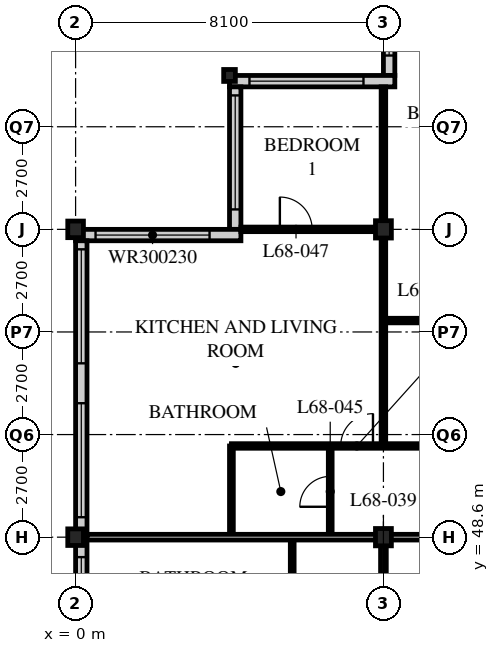
"""IFC4 building model, lengths in metres.
Left out: names, types, materials, properties, quantities, classifications, styles, units other than length and angle.
Written with IfcOpenShell. Run it as: python <this file> out.ifc"""

import sys

from ifc_helpers import new_model, si_unit, direction, frame, frame_2d, origin, origin_2d, place, context, subcontext, project, spatial, rectangle, i_section, extrude, element, fill, save


model = new_model("IFC4")
c1 = context("Model", 3, precision=1e-05, world=origin(), true_north=direction((0.0, 1.0)))
c2 = subcontext(c1, "Body", "Model", "MODEL_VIEW")
j1 = project(units=[si_unit("LENGTHUNIT", "METRE"), si_unit("PLANEANGLEUNIT", "RADIAN")], contexts=[c1])
p1 = place(None, origin())
s1 = spatial("IfcSite", under=j1, at=p1, CompositionType="ELEMENT")
p2 = place(p1, origin())
s2 = spatial("IfcBuilding", under=s1, at=p2, CompositionType="ELEMENT")
p3 = place(p2, frame((0.0, 0.0, 265.8)))
s3 = spatial("IfcBuildingStorey", under=s2, at=p3, CompositionType="ELEMENT", Elevation=265.8)
for number, where, z_axis, x_axis in (
    (1, (0.0, 48.6, 0.0), (0.0, 0.0, 1.0), (1.0, 0.0, 0.0)),
    (2, (0.0, 56.7, 0.0), (0.0, 0.0, 1.0), (1.0, 0.0, 0.0)),
):
    element("IfcColumn", number, at=place(p3, frame(where, z_axis=z_axis, x_axis=x_axis)), inside=s3, PredefinedType="COLUMN", context=c2, shape_type="SweptSolid", body=[
        extrude(i_section(OverallWidth=0.412, OverallDepth=0.437, WebThickness=0.036, FlangeThickness=0.058, FilletRadius=0.015, at=origin_2d()), origin(), (0.0, 0.0, 1.0), 3.9),
    ])
p4 = place(p3, frame((4.05, 60.75, 0.0), z_axis=(0.0, 0.0, 1.0), x_axis=(1.0, 0.0, 0.0)))
e3 = element("IfcColumn", 3, at=p4, inside=s3, PredefinedType="COLUMN", context=c2, shape_type="SweptSolid", body=[
    extrude(i_section(OverallWidth=0.307, OverallDepth=0.314, WebThickness=0.012, FlangeThickness=0.019, FilletRadius=0.015, at=origin_2d()), origin(), (0.0, 0.0, 1.0), 3.9),
])
for number, where, z_axis, x_axis in (
    (4, (8.1, 48.6, 0.0), (0.0, 0.0, 1.0), (1.0, 0.0, 0.0)),
    (5, (8.1, 56.7, 0.0), (0.0, 0.0, 1.0), (1.0, 0.0, 0.0)),
):
    element("IfcColumn", number, at=place(p3, frame(where, z_axis=z_axis, x_axis=x_axis)), inside=s3, PredefinedType="COLUMN", context=c2, shape_type="SweptSolid", body=[
        extrude(i_section(OverallWidth=0.418, OverallDepth=0.456, WebThickness=0.042, FlangeThickness=0.067, FilletRadius=0.015, at=origin_2d()), origin(), (0.0, 0.0, 1.0), 3.9),
    ])
p5 = place(p3, frame((8.25, 64.5, 0.0), z_axis=(0.0, 0.0, 1.0), x_axis=(0.0, -1.0, 0.0)))
e6 = element("IfcWall", 6, at=p5, inside=s3, PredefinedType="SOLIDWALL", context=c2, shape_type="SweptSolid", body=[
    extrude(rectangle(XDim=3.75, YDim=0.3, at=frame_2d((1.875, 0.0))), origin(), (0.0, 0.0, 1.0), 3.69),
])
p6 = place(p5, frame((0.225, 0.0, 0.6)))
e7 = element("IfcOpeningElement", 7, at=p6, cuts=e6, PredefinedType="OPENING", context=c2, shape_type="SweptSolid", body=[
    extrude(rectangle(XDim=3.0, YDim=2.3, at=frame_2d((1.5, 1.15))), frame((0.0, 0.16, 0.0), z_axis=(0.0, -1.0, 0.0), x_axis=(1.0, 0.0, 0.0)), (0.0, 0.0, 1.0), 0.32),
])
p7 = place(p3, frame((8.4, 60.6, 0.0), z_axis=(0.0, 0.0, 1.0), x_axis=(-1.0, 0.0, 0.0)))
e8 = element("IfcWall", 8, at=p7, inside=s3, PredefinedType="SOLIDWALL", context=c2, shape_type="SweptSolid", body=[
    extrude(rectangle(XDim=4.35, YDim=0.3, at=frame_2d((2.175, 0.0))), origin(), (0.0, 0.0, 1.0), 3.69),
])
p8 = place(p7, frame((0.825, 0.0, 0.6)))
e9 = element("IfcOpeningElement", 9, at=p8, cuts=e8, PredefinedType="OPENING", context=c2, shape_type="SweptSolid", body=[
    extrude(rectangle(XDim=3.0, YDim=2.3, at=frame_2d((1.5, 1.15))), frame((0.0, 0.16, 0.0), z_axis=(0.0, -1.0, 0.0), x_axis=(1.0, 0.0, 0.0)), (0.0, 0.0, 1.0), 0.32),
])
p9 = place(p3, frame((4.2, 60.45, 0.0), z_axis=(0.0, 0.0, 1.0), x_axis=(0.0, -1.0, 0.0)))
e10 = element("IfcWall", 10, at=p9, inside=s3, PredefinedType="SOLIDWALL", context=c2, shape_type="SweptSolid", body=[
    extrude(rectangle(XDim=3.75, YDim=0.3, at=frame_2d((1.875, 0.0))), origin(), (0.0, 0.0, 1.0), 3.69),
])
p10 = place(p9, frame((0.225, 0.0, 0.6)))
e11 = element("IfcOpeningElement", 11, at=p10, cuts=e10, PredefinedType="OPENING", context=c2, shape_type="SweptSolid", body=[
    extrude(rectangle(XDim=3.0, YDim=2.3, at=frame_2d((1.5, 1.15))), frame((0.0, 0.16, 0.0), z_axis=(0.0, -1.0, 0.0), x_axis=(1.0, 0.0, 0.0)), (0.0, 0.0, 1.0), 0.32),
])
p11 = place(p3, frame((4.35, 56.55, 0.0), z_axis=(0.0, 0.0, 1.0), x_axis=(-1.0, 0.0, 0.0)))
e12 = element("IfcWall", 12, at=p11, inside=s3, PredefinedType="SOLIDWALL", context=c2, shape_type="SweptSolid", body=[
    extrude(rectangle(XDim=4.35, YDim=0.3, at=frame_2d((2.175, 0.0))), origin(), (0.0, 0.0, 1.0), 3.69),
])
p12 = place(p11, frame((0.825, 0.0, 0.6)))
e13 = element("IfcOpeningElement", 13, at=p12, cuts=e12, PredefinedType="OPENING", context=c2, shape_type="SweptSolid", body=[
    extrude(rectangle(XDim=3.0, YDim=2.3, at=frame_2d((1.5, 1.15))), frame((0.0, 0.16, 0.0), z_axis=(0.0, -1.0, 0.0), x_axis=(1.0, 0.0, 0.0)), (0.0, 0.0, 1.0), 0.32),
])
p13 = place(p3, frame((0.15, 56.4, 0.0), z_axis=(0.0, 0.0, 1.0), x_axis=(0.0, -1.0, 0.0)))
e14 = element("IfcWall", 14, at=p13, inside=s3, PredefinedType="SOLIDWALL", context=c2, shape_type="SweptSolid", body=[
    extrude(rectangle(XDim=32.1, YDim=0.3, at=frame_2d((16.05, 0.0))), origin(), (0.0, 0.0, 1.0), 3.69),
])
p14 = place(p13, frame((0.225, 0.0, 0.6)))
e15 = element("IfcOpeningElement", 15, at=p14, cuts=e14, PredefinedType="OPENING", context=c2, shape_type="SweptSolid", body=[
    extrude(rectangle(XDim=3.0, YDim=2.4, at=frame_2d((1.5, 1.2))), frame((0.0, 0.16, 0.0), z_axis=(0.0, -1.0, 0.0), x_axis=(1.0, 0.0, 0.0)), (0.0, 0.0, 1.0), 0.32),
])
p15 = place(p13, frame((4.275, 0.0, 0.6)))
e16 = element("IfcOpeningElement", 16, at=p15, cuts=e14, PredefinedType="OPENING", context=c2, shape_type="SweptSolid", body=[
    extrude(rectangle(XDim=3.0, YDim=2.4, at=frame_2d((1.5, 1.2))), frame((0.0, 0.16, 0.0), z_axis=(0.0, -1.0, 0.0), x_axis=(1.0, 0.0, 0.0)), (0.0, 0.0, 1.0), 0.32),
])
p16 = place(p13, frame((8.325, 0.0, 0.6)))
e17 = element("IfcOpeningElement", 17, at=p16, cuts=e14, PredefinedType="OPENING", context=c2, shape_type="SweptSolid", body=[
    extrude(rectangle(XDim=3.0, YDim=2.4, at=frame_2d((1.5, 1.2))), frame((0.0, 0.16, 0.0), z_axis=(0.0, -1.0, 0.0), x_axis=(1.0, 0.0, 0.0)), (0.0, 0.0, 1.0), 0.32),
])
p17 = place(p13, frame((12.375, 0.0, 0.6)))
e18 = element("IfcOpeningElement", 18, at=p17, cuts=e14, PredefinedType="OPENING", context=c2, shape_type="SweptSolid", body=[
    extrude(rectangle(XDim=3.0, YDim=2.4, at=frame_2d((1.5, 1.2))), frame((0.0, 0.16, 0.0), z_axis=(0.0, -1.0, 0.0), x_axis=(1.0, 0.0, 0.0)), (0.0, 0.0, 1.0), 0.32),
])
p18 = place(p13, frame((16.425, 0.0, 0.6)))
e19 = element("IfcOpeningElement", 19, at=p18, cuts=e14, PredefinedType="OPENING", context=c2, shape_type="SweptSolid", body=[
    extrude(rectangle(XDim=3.0, YDim=2.4, at=frame_2d((1.5, 1.2))), frame((0.0, 0.16, 0.0), z_axis=(0.0, -1.0, 0.0), x_axis=(1.0, 0.0, 0.0)), (0.0, 0.0, 1.0), 0.32),
])
p19 = place(p13, frame((20.475, 0.0, 0.6)))
e20 = element("IfcOpeningElement", 20, at=p19, cuts=e14, PredefinedType="OPENING", context=c2, shape_type="SweptSolid", body=[
    extrude(rectangle(XDim=3.0, YDim=2.4, at=frame_2d((1.5, 1.2))), frame((0.0, 0.16, 0.0), z_axis=(0.0, -1.0, 0.0), x_axis=(1.0, 0.0, 0.0)), (0.0, 0.0, 1.0), 0.32),
])
p20 = place(p13, frame((24.525, 0.0, 0.6)))
e21 = element("IfcOpeningElement", 21, at=p20, cuts=e14, PredefinedType="OPENING", context=c2, shape_type="SweptSolid", body=[
    extrude(rectangle(XDim=3.0, YDim=2.4, at=frame_2d((1.5, 1.2))), frame((0.0, 0.16, 0.0), z_axis=(0.0, -1.0, 0.0), x_axis=(1.0, 0.0, 0.0)), (0.0, 0.0, 1.0), 0.32),
])
p21 = place(p13, frame((28.575, 0.0, 0.6)))
e22 = element("IfcOpeningElement", 22, at=p21, cuts=e14, PredefinedType="OPENING", context=c2, shape_type="SweptSolid", body=[
    extrude(rectangle(XDim=3.0, YDim=2.4, at=frame_2d((1.5, 1.2))), frame((0.0, 0.16, 0.0), z_axis=(0.0, -1.0, 0.0), x_axis=(1.0, 0.0, 0.0)), (0.0, 0.0, 1.0), 0.32),
])
p22 = place(p3, frame((8.1, 48.6, 0.0), z_axis=(0.0, 0.0, 1.0), x_axis=(1.0, 0.0, 0.0)))
e23 = element("IfcWall", 23, at=p22, inside=s3, PredefinedType="PARTITIONING", context=c2, shape_type="SweptSolid", body=[
    extrude(rectangle(XDim=28.35, YDim=0.15, at=frame_2d((14.175, 0.0))), origin(), (0.0, 0.0, 1.0), 3.078),
])
p23 = place(p22, frame((4.45, 0.0, 0.0)))
e24 = element("IfcOpeningElement", 24, at=p23, cuts=e23, PredefinedType="OPENING", context=c2, shape_type="SweptSolid", body=[
    extrude(rectangle(XDim=1.0, YDim=2.1, at=frame_2d((0.5, 1.05))), frame((0.0, 0.085, 0.0), z_axis=(0.0, -1.0, 0.0), x_axis=(1.0, 0.0, 0.0)), (0.0, 0.0, 1.0), 0.17),
])
p24 = place(p22, frame((20.65, 0.0, 0.0)))
e25 = element("IfcOpeningElement", 25, at=p24, cuts=e23, PredefinedType="OPENING", context=c2, shape_type="SweptSolid", body=[
    extrude(rectangle(XDim=1.0, YDim=2.1, at=frame_2d((0.5, 1.05))), frame((0.0, 0.085, 0.0), z_axis=(0.0, -1.0, 0.0), x_axis=(1.0, 0.0, 0.0)), (0.0, 0.0, 1.0), 0.17),
])
p25 = place(p22, frame((1.525, 0.0, 0.0)))
e26 = element("IfcOpeningElement", 26, at=p25, cuts=e23, PredefinedType="OPENING", context=c2, shape_type="SweptSolid", body=[
    extrude(rectangle(XDim=1.0, YDim=2.1, at=frame_2d((0.5, 1.05))), frame((0.0, 0.085, 0.0), z_axis=(0.0, -1.0, 0.0), x_axis=(1.0, 0.0, 0.0)), (0.0, 0.0, 1.0), 0.17),
])
p26 = place(p3, frame((8.1, 22.5, 0.0), z_axis=(0.0, 0.0, 1.0), x_axis=(0.0, 1.0, 0.0)))
e27 = element("IfcWall", 27, at=p26, inside=s3, PredefinedType="PARTITIONING", context=c2, shape_type="SweptSolid", body=[
    extrude(rectangle(XDim=26.1, YDim=0.15, at=frame_2d((13.05, 0.0))), origin(), (0.0, 0.0, 1.0), 3.078),
])
p27 = place(p26, frame((2.65, 0.0, 0.0)))
e28 = element("IfcOpeningElement", 28, at=p27, cuts=e27, PredefinedType="OPENING", context=c2, shape_type="SweptSolid", body=[
    extrude(rectangle(XDim=1.0, YDim=2.1, at=frame_2d((0.5, 1.05))), frame((0.0, 0.085, 0.0), z_axis=(0.0, -1.0, 0.0), x_axis=(1.0, 0.0, 0.0)), (0.0, 0.0, 1.0), 0.17),
])
p28 = place(p26, frame((22.75, 0.0, 0.0)))
e29 = element("IfcOpeningElement", 29, at=p28, cuts=e27, PredefinedType="OPENING", context=c2, shape_type="SweptSolid", body=[
    extrude(rectangle(XDim=1.0, YDim=2.1, at=frame_2d((0.5, 1.05))), frame((0.0, 0.085, 0.0), z_axis=(0.0, -1.0, 0.0), x_axis=(1.0, 0.0, 0.0)), (0.0, 0.0, 1.0), 0.17),
])
p29 = place(p3, frame((5.7, 46.4, 0.0), z_axis=(0.0, 0.0, 1.0), x_axis=(0.0, 1.0, 0.0)))
e30 = element("IfcWall", 30, at=p29, inside=s3, PredefinedType="PARTITIONING", context=c2, shape_type="SweptSolid", body=[
    extrude(rectangle(XDim=2.2, YDim=0.1, at=frame_2d((1.1, 0.0))), origin(), (0.0, 0.0, 1.0), 3.69),
])
p30 = place(p3, frame((6.7, 48.6, 0.0), z_axis=(0.0, 0.0, 1.0), x_axis=(0.0, 1.0, 0.0)))
e31 = element("IfcWall", 31, at=p30, inside=s3, PredefinedType="PARTITIONING", context=c2, shape_type="SweptSolid", body=[
    extrude(rectangle(XDim=2.4, YDim=0.1, at=frame_2d((1.2, 0.0))), origin(), (0.0, 0.0, 1.0), 3.69),
])
p31 = place(p30, frame((0.8, 0.0, 0.0)))
e32 = element("IfcOpeningElement", 32, at=p31, cuts=e31, PredefinedType="OPENING", context=c2, shape_type="SweptSolid", body=[
    extrude(rectangle(XDim=0.8, YDim=2.1, at=frame_2d((0.4, 1.05))), frame((0.0, 0.06, 0.0), z_axis=(0.0, -1.0, 0.0), x_axis=(1.0, 0.0, 0.0)), (0.0, 0.0, 1.0), 0.12),
])
p32 = place(p3, frame((4.1, 48.6, 0.0), z_axis=(0.0, 0.0, 1.0), x_axis=(0.0, 1.0, 0.0)))
e33 = element("IfcWall", 33, at=p32, inside=s3, PredefinedType="PARTITIONING", context=c2, shape_type="SweptSolid", body=[
    extrude(rectangle(XDim=2.4, YDim=0.1, at=frame_2d((1.2, 0.0))), origin(), (0.0, 0.0, 1.0), 3.69),
])
p33 = place(p3, frame((4.1, 51.0, 0.0), z_axis=(0.0, 0.0, 1.0), x_axis=(1.0, 0.0, 0.0)))
e34 = element("IfcWall", 34, at=p33, inside=s3, PredefinedType="PARTITIONING", context=c2, shape_type="SweptSolid", body=[
    extrude(rectangle(XDim=32.35, YDim=0.12, at=frame_2d((16.175, 0.0))), origin(), (0.0, 0.0, 1.0), 3.69),
])
p34 = place(p33, frame((9.025, 0.0, 0.0)))
e35 = element("IfcOpeningElement", 35, at=p34, cuts=e34, PredefinedType="OPENING", context=c2, shape_type="SweptSolid", body=[
    extrude(rectangle(XDim=0.85, YDim=2.1, at=frame_2d((0.425, 1.05))), frame((0.0, 0.07, 0.0), z_axis=(0.0, -1.0, 0.0), x_axis=(1.0, 0.0, 0.0)), (0.0, 0.0, 1.0), 0.14),
])
p35 = place(p33, frame((16.475, 0.0, 0.0)))
e36 = element("IfcOpeningElement", 36, at=p35, cuts=e34, PredefinedType="OPENING", context=c2, shape_type="SweptSolid", body=[
    extrude(rectangle(XDim=0.85, YDim=2.1, at=frame_2d((0.425, 1.05))), frame((0.0, 0.07, 0.0), z_axis=(0.0, -1.0, 0.0), x_axis=(1.0, 0.0, 0.0)), (0.0, 0.0, 1.0), 0.14),
])
p36 = place(p33, frame((20.525, 0.0, 0.0)))
e37 = element("IfcOpeningElement", 37, at=p36, cuts=e34, PredefinedType="OPENING", context=c2, shape_type="SweptSolid", body=[
    extrude(rectangle(XDim=0.85, YDim=2.1, at=frame_2d((0.425, 1.05))), frame((0.0, 0.07, 0.0), z_axis=(0.0, -1.0, 0.0), x_axis=(1.0, 0.0, 0.0)), (0.0, 0.0, 1.0), 0.14),
])
p37 = place(p33, frame((25.225, 0.0, 0.0)))
e38 = element("IfcOpeningElement", 38, at=p37, cuts=e34, PredefinedType="OPENING", context=c2, shape_type="SweptSolid", body=[
    extrude(rectangle(XDim=0.85, YDim=2.1, at=frame_2d((0.425, 1.05))), frame((0.0, 0.07, 0.0), z_axis=(0.0, -1.0, 0.0), x_axis=(1.0, 0.0, 0.0)), (0.0, 0.0, 1.0), 0.14),
])
p38 = place(p33, frame((28.625, 0.0, 0.0)))
e39 = element("IfcOpeningElement", 39, at=p38, cuts=e34, PredefinedType="OPENING", context=c2, shape_type="SweptSolid", body=[
    extrude(rectangle(XDim=0.85, YDim=2.1, at=frame_2d((0.425, 1.05))), frame((0.0, 0.07, 0.0), z_axis=(0.0, -1.0, 0.0), x_axis=(1.0, 0.0, 0.0)), (0.0, 0.0, 1.0), 0.14),
])
p39 = place(p33, frame((6.725, 0.0, 0.0)))
e40 = element("IfcOpeningElement", 40, at=p39, cuts=e34, PredefinedType="OPENING", context=c2, shape_type="SweptSolid", body=[
    extrude(rectangle(XDim=0.85, YDim=2.1, at=frame_2d((0.425, 1.05))), frame((0.0, 0.07, 0.0), z_axis=(0.0, -1.0, 0.0), x_axis=(1.0, 0.0, 0.0)), (0.0, 0.0, 1.0), 0.14),
])
p40 = place(p33, frame((2.875, 0.0, 0.0)))
e41 = element("IfcOpeningElement", 41, at=p40, cuts=e34, PredefinedType="OPENING", context=c2, shape_type="SweptSolid", body=[
    extrude(rectangle(XDim=0.85, YDim=2.1, at=frame_2d((0.425, 1.05))), frame((0.0, 0.07, 0.0), z_axis=(0.0, -1.0, 0.0), x_axis=(1.0, 0.0, 0.0)), (0.0, 0.0, 1.0), 0.14),
])
p41 = place(p3, frame((8.1, 51.0, 0.0), z_axis=(0.0, 0.0, 1.0), x_axis=(0.0, 1.0, 0.0)))
e42 = element("IfcWall", 42, at=p41, inside=s3, PredefinedType="PARTITIONING", context=c2, shape_type="SweptSolid", body=[
    extrude(rectangle(XDim=9.45, YDim=0.12, at=frame_2d((4.725, 0.0))), origin(), (0.0, 0.0, 1.0), 3.078),
])
p42 = place(p3, frame((8.1, 56.7, 0.0), z_axis=(0.0, 0.0, 1.0), x_axis=(-1.0, 0.0, 0.0)))
e43 = element("IfcWall", 43, at=p42, inside=s3, PredefinedType="PARTITIONING", context=c2, shape_type="SweptSolid", body=[
    extrude(rectangle(XDim=3.75, YDim=0.12, at=frame_2d((1.875, 0.0))), origin(), (0.0, 0.0, 1.0), 3.078),
])
p43 = place(p42, frame((1.875, 0.0, 0.0)))
e44 = element("IfcOpeningElement", 44, at=p43, cuts=e43, PredefinedType="OPENING", context=c2, shape_type="SweptSolid", body=[
    extrude(rectangle(XDim=0.85, YDim=2.1, at=frame_2d((0.425, 1.05))), frame((0.0, 0.07, 0.0), z_axis=(0.0, -1.0, 0.0), x_axis=(1.0, 0.0, 0.0)), (0.0, 0.0, 1.0), 0.14),
])
p44 = place(p3, frame((0.3, 48.6, 0.0), z_axis=(0.0, 0.0, 1.0), x_axis=(1.0, 0.0, 0.0)))
e45 = element("IfcWall", 45, at=p44, inside=s3, PredefinedType="PARTITIONING", context=c2, shape_type="SweptSolid", body=[
    extrude(rectangle(XDim=7.8, YDim=0.15, at=frame_2d((3.9, 0.0))), origin(), (0.0, 0.0, 1.0), 3.078),
])
p45 = place(p3, frame((8.1, 54.3, 0.0), z_axis=(0.0, 0.0, 1.0), x_axis=(1.0, 0.0, 0.0)))
e46 = element("IfcWall", 46, at=p45, inside=s3, PredefinedType="PARTITIONING", context=c2, shape_type="SweptSolid", body=[
    extrude(rectangle(XDim=4.05, YDim=0.12, at=frame_2d((2.025, 0.0))), origin(), (0.0, 0.0, 1.0), 3.69),
])
p46 = place(p45, frame((1.6, 0.0, 0.0)))
e47 = element("IfcOpeningElement", 47, at=p46, cuts=e46, PredefinedType="OPENING", context=c2, shape_type="SweptSolid", body=[
    extrude(rectangle(XDim=0.85, YDim=2.1, at=frame_2d((0.425, 1.05))), frame((0.0, 0.07, 0.0), z_axis=(0.0, -1.0, 0.0), x_axis=(1.0, 0.0, 0.0)), (0.0, 0.0, 1.0), 0.14),
])
p47 = place(p6, origin())
e48 = element("IfcWindow", 48, at=p47, inside=s3, PartitioningType="SINGLE_PANEL", PredefinedType="WINDOW", context=c2, shape_type="SweptSolid", body=[
    extrude(rectangle(XDim=3.0, YDim=2.3, at=frame_2d((1.5, 1.15))), frame((0.0, 0.03, 0.0), z_axis=(0.0, -1.0, 0.0), x_axis=(1.0, 0.0, 0.0)), (0.0, 0.0, 1.0), 0.06),
])
fill(e7, e48)
p48 = place(p8, origin())
e49 = element("IfcWindow", 49, at=p48, inside=s3, PartitioningType="SINGLE_PANEL", PredefinedType="WINDOW", context=c2, shape_type="SweptSolid", body=[
    extrude(rectangle(XDim=3.0, YDim=2.3, at=frame_2d((1.5, 1.15))), frame((0.0, 0.03, 0.0), z_axis=(0.0, -1.0, 0.0), x_axis=(1.0, 0.0, 0.0)), (0.0, 0.0, 1.0), 0.06),
])
fill(e9, e49)
p49 = place(p10, origin())
e50 = element("IfcWindow", 50, at=p49, inside=s3, PartitioningType="SINGLE_PANEL", PredefinedType="WINDOW", context=c2, shape_type="SweptSolid", body=[
    extrude(rectangle(XDim=3.0, YDim=2.3, at=frame_2d((1.5, 1.15))), frame((0.0, 0.03, 0.0), z_axis=(0.0, -1.0, 0.0), x_axis=(1.0, 0.0, 0.0)), (0.0, 0.0, 1.0), 0.06),
])
fill(e11, e50)
p50 = place(p12, origin())
e51 = element("IfcWindow", 51, at=p50, inside=s3, PartitioningType="SINGLE_PANEL", PredefinedType="WINDOW", context=c2, shape_type="SweptSolid", body=[
    extrude(rectangle(XDim=3.0, YDim=2.3, at=frame_2d((1.5, 1.15))), frame((0.0, 0.03, 0.0), z_axis=(0.0, -1.0, 0.0), x_axis=(1.0, 0.0, 0.0)), (0.0, 0.0, 1.0), 0.06),
])
fill(e13, e51)
p51 = place(p14, origin())
e52 = element("IfcWindow", 52, at=p51, inside=s3, PartitioningType="SINGLE_PANEL", PredefinedType="WINDOW", context=c2, shape_type="SweptSolid", body=[
    extrude(rectangle(XDim=3.0, YDim=2.4, at=frame_2d((1.5, 1.2))), frame((0.0, 0.03, 0.0), z_axis=(0.0, -1.0, 0.0), x_axis=(1.0, 0.0, 0.0)), (0.0, 0.0, 1.0), 0.06),
])
fill(e15, e52)
p52 = place(p15, origin())
e53 = element("IfcWindow", 53, at=p52, inside=s3, PartitioningType="SINGLE_PANEL", PredefinedType="WINDOW", context=c2, shape_type="SweptSolid", body=[
    extrude(rectangle(XDim=3.0, YDim=2.4, at=frame_2d((1.5, 1.2))), frame((0.0, 0.03, 0.0), z_axis=(0.0, -1.0, 0.0), x_axis=(1.0, 0.0, 0.0)), (0.0, 0.0, 1.0), 0.06),
])
fill(e16, e53)
p53 = place(p16, origin())
e54 = element("IfcWindow", 54, at=p53, inside=s3, PartitioningType="SINGLE_PANEL", PredefinedType="WINDOW", context=c2, shape_type="SweptSolid", body=[
    extrude(rectangle(XDim=3.0, YDim=2.4, at=frame_2d((1.5, 1.2))), frame((0.0, 0.03, 0.0), z_axis=(0.0, -1.0, 0.0), x_axis=(1.0, 0.0, 0.0)), (0.0, 0.0, 1.0), 0.06),
])
fill(e17, e54)
p54 = place(p31, origin())
e55 = element("IfcDoor", 55, at=p54, inside=s3, OperationType="SINGLE_SWING_LEFT", PredefinedType="DOOR", context=c2, shape_type="SweptSolid", body=[
    extrude(rectangle(XDim=0.8, YDim=2.1, at=frame_2d((0.4, 1.05))), frame((0.0, 0.025, 0.0), z_axis=(0.0, -1.0, 0.0), x_axis=(1.0, 0.0, 0.0)), (0.0, 0.0, 1.0), 0.05),
])
fill(e32, e55)
p55 = place(p40, origin())
e56 = element("IfcDoor", 56, at=p55, inside=s3, OperationType="SINGLE_SWING_RIGHT", PredefinedType="DOOR", context=c2, shape_type="SweptSolid", body=[
    extrude(rectangle(XDim=0.85, YDim=2.1, at=frame_2d((0.425, 1.05))), frame((0.0, 0.025, 0.0), z_axis=(0.0, -1.0, 0.0), x_axis=(1.0, 0.0, 0.0)), (0.0, 0.0, 1.0), 0.05),
])
fill(e41, e56)
p56 = place(p43, origin())
e57 = element("IfcDoor", 57, at=p56, inside=s3, OperationType="SINGLE_SWING_LEFT", PredefinedType="DOOR", context=c2, shape_type="SweptSolid", body=[
    extrude(rectangle(XDim=0.85, YDim=2.1, at=frame_2d((0.425, 1.05))), frame((0.0, 0.025, 0.0), z_axis=(0.0, -1.0, 0.0), x_axis=(1.0, 0.0, 0.0)), (0.0, 0.0, 1.0), 0.05),
])
fill(e44, e57)
save(model, sys.argv[1])
